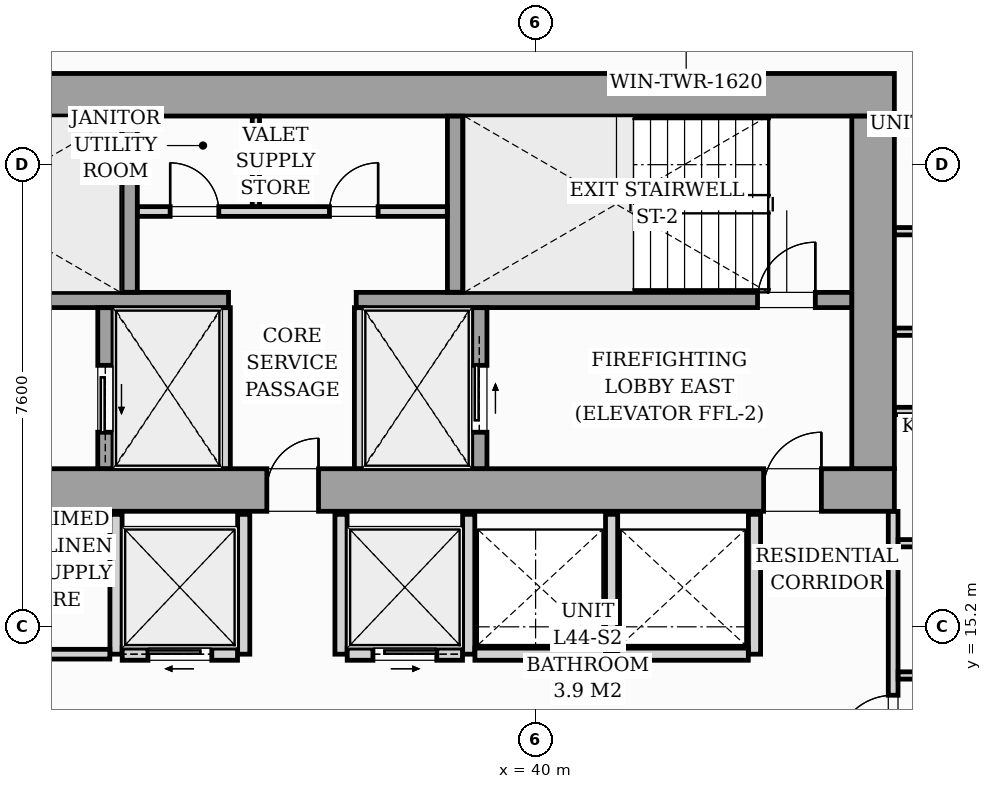
"""IFC4 building model, lengths in metres.
Left out: names, types, materials, properties, quantities, classifications, styles, units other than length and angle.
Written with IfcOpenShell. Run it as: python <this file> out.ifc"""

import sys

from ifc_helpers import new_model, si_unit, direction, frame, frame_2d, origin, origin_2d, place, context, subcontext, project, spatial, rectangle, i_section, extrude, source, transform, mapped, element, fill, save


model = new_model("IFC4")
c1 = context("Model", 3, precision=1e-05, world=origin(), true_north=direction((0.0, 1.0)))
c2 = subcontext(c1, "Body", "Model", "MODEL_VIEW")
j1 = project(units=[si_unit("LENGTHUNIT", "METRE"), si_unit("PLANEANGLEUNIT", "RADIAN")], contexts=[c1])
p1 = place(None, origin())
s1 = spatial("IfcSite", under=j1, at=p1, CompositionType="ELEMENT")
p2 = place(p1, origin())
s2 = spatial("IfcBuilding", under=s1, at=p2, CompositionType="ELEMENT")
p3 = place(p2, frame((0.0, 0.0, 153.4)))
s3 = spatial("IfcBuildingStorey", under=s2, at=p3, CompositionType="ELEMENT", Elevation=153.4)
m1 = source(origin(), c2, "Body", "SweptSolid", [
    extrude(i_section(OverallWidth=0.421, OverallDepth=0.465, WebThickness=0.045, FlangeThickness=0.073, FilletRadius=0.018, at=origin_2d()), origin(), (0.0, 0.0, 1.0), 3.196),
])
for number, where, z_axis, x_axis in (
    (1, (33.12, 17.4, 0.002), (0.0, 0.0, 1.0), (1.0, 0.0, 0.0)),
    (2, (38.88, 17.4, 0.002), (0.0, 0.0, 1.0), (1.0, 0.0, 0.0)),
    (3, (45.6, 17.4, 0.002), (0.0, 0.0, 1.0), (1.0, 0.0, 0.0)),
    (4, (33.12, 24.0, 0.002), (0.0, 0.0, 1.0), (1.0, 0.0, 0.0)),
    (5, (38.88, 24.0, 0.002), (0.0, 0.0, 1.0), (1.0, 0.0, 0.0)),
    (6, (45.6, 24.0, 0.002), (0.0, 0.0, 1.0), (1.0, 0.0, 0.0)),
):
    element("IfcColumn", number, at=place(p3, frame(where, z_axis=z_axis, x_axis=x_axis)), inside=s3, PredefinedType="PILASTER", context=c2, shape_type="MappedRepresentation", body=[
        mapped(m1, transform((0.0, 0.0, 0.0), scale=1.0)),
    ])
p4 = place(p3, frame((40.983, 25.727, 0.0), z_axis=(0.0, 0.0, 1.0), x_axis=(0.995395844771, -0.095849424686, 0.0)))
e7 = element("IfcWall", 7, at=p4, inside=s3, PredefinedType="STANDARD", context=c2, shape_type="SweptSolid", body=[
    extrude(rectangle(XDim=17.01, YDim=0.26, at=frame_2d((8.505, 0.0))), origin(), (0.0, 0.0, 1.0), 2.94),
])
p5 = place(p4, frame((9.25, 0.0, 0.0)))
e8 = element("IfcOpeningElement", 8, at=p5, cuts=e7, PredefinedType="OPENING", context=c2, shape_type="SweptSolid", body=[
    extrude(rectangle(XDim=1.8, YDim=2.06, at=frame_2d((0.9, 1.03))), frame((0.0, 0.14, 0.0), z_axis=(0.0, -1.0, 0.0), x_axis=(1.0, 0.0, 0.0)), (0.0, 0.0, 1.0), 0.28),
])
p6 = place(p4, frame((0.7, 0.0, 0.65)))
e9 = element("IfcOpeningElement", 9, at=p6, cuts=e7, PredefinedType="OPENING", context=c2, shape_type="SweptSolid", body=[
    extrude(rectangle(XDim=1.6, YDim=1.5, at=frame_2d((0.8, 0.75))), frame((0.0, 0.14, 0.0), z_axis=(0.0, -1.0, 0.0), x_axis=(1.0, 0.0, 0.0)), (0.0, 0.0, 1.0), 0.28),
])
p7 = place(p3, frame((26.1, 17.45, 0.0), z_axis=(0.0, 0.0, 1.0), x_axis=(1.0, 0.0, 0.0)))
e10 = element("IfcWall", 10, at=p7, inside=s3, PredefinedType="SHEAR", context=c2, shape_type="SweptSolid", body=[
    extrude(rectangle(XDim=19.8, YDim=0.7, at=frame_2d((9.9, 0.0))), origin(), (0.0, 0.0, 1.0), 3.2),
])
p8 = place(p7, frame((1.05, 0.0, 0.0)))
e11 = element("IfcOpeningElement", 11, at=p8, cuts=e10, PredefinedType="OPENING", context=c2, shape_type="SweptSolid", body=[
    extrude(rectangle(XDim=0.95, YDim=2.06, at=frame_2d((0.475, 1.03))), frame((0.0, 0.36, 0.0), z_axis=(0.0, -1.0, 0.0), x_axis=(1.0, 0.0, 0.0)), (0.0, 0.0, 1.0), 0.72),
])
p9 = place(p7, frame((9.48, 0.0, 0.0)))
e12 = element("IfcOpeningElement", 12, at=p9, cuts=e10, PredefinedType="OPENING", context=c2, shape_type="SweptSolid", body=[
    extrude(rectangle(XDim=0.85, YDim=2.0, at=frame_2d((0.425, 1.0))), frame((0.0, 0.36, 0.0), z_axis=(0.0, -1.0, 0.0), x_axis=(1.0, 0.0, 0.0)), (0.0, 0.0, 1.0), 0.72),
])
p10 = place(p7, frame((17.65, 0.0, 0.0)))
e13 = element("IfcOpeningElement", 13, at=p10, cuts=e10, PredefinedType="OPENING", context=c2, shape_type="SweptSolid", body=[
    extrude(rectangle(XDim=0.95, YDim=2.06, at=frame_2d((0.475, 1.03))), frame((0.0, 0.36, 0.0), z_axis=(0.0, -1.0, 0.0), x_axis=(1.0, 0.0, 0.0)), (0.0, 0.0, 1.0), 0.72),
])
p11 = place(p3, frame((26.1, 23.95, 0.0), z_axis=(0.0, 0.0, 1.0), x_axis=(1.0, 0.0, 0.0)))
e14 = element("IfcWall", 14, at=p11, inside=s3, PredefinedType="SHEAR", context=c2, shape_type="SweptSolid", body=[
    extrude(rectangle(XDim=19.8, YDim=0.7, at=frame_2d((9.9, 0.0))), origin(), (0.0, 0.0, 1.0), 3.2),
])
p12 = place(p3, frame((45.55, 17.802, 0.0), z_axis=(0.0, 0.0, 1.0), x_axis=(0.0, 1.0, 0.0)))
e15 = element("IfcWall", 15, at=p12, inside=s3, PredefinedType="SHEAR", context=c2, shape_type="SweptSolid", body=[
    extrude(rectangle(XDim=5.796, YDim=0.7, at=frame_2d((2.898, 0.0))), origin(), (0.0, 0.0, 1.0), 3.2),
])
p13 = place(p3, frame((26.802, 20.575, 0.0), z_axis=(0.0, 0.0, 1.0), x_axis=(1.0, 0.0, 0.0)))
e16 = element("IfcWall", 16, at=p13, inside=s3, PredefinedType="SOLIDWALL", context=c2, shape_type="SweptSolid", body=[
    extrude(rectangle(XDim=8.148, YDim=0.25, at=frame_2d((4.074, 0.0))), origin(), (0.0, 0.0, 1.0), 3.2),
])
p14 = place(p13, frame((0.348, 0.0, 0.0)))
e17 = element("IfcOpeningElement", 17, at=p14, cuts=e16, PredefinedType="OPENING", context=c2, shape_type="SweptSolid", body=[
    extrude(rectangle(XDim=0.95, YDim=2.06, at=frame_2d((0.475, 1.03))), frame((0.0, 0.135, 0.0), z_axis=(0.0, -1.0, 0.0), x_axis=(1.0, 0.0, 0.0)), (0.0, 0.0, 1.0), 0.27),
])
p15 = place(p3, frame((37.05, 20.575, 0.0), z_axis=(0.0, 0.0, 1.0), x_axis=(1.0, 0.0, 0.0)))
e18 = element("IfcWall", 18, at=p15, inside=s3, PredefinedType="SOLIDWALL", context=c2, shape_type="SweptSolid", body=[
    extrude(rectangle(XDim=8.148, YDim=0.25, at=frame_2d((4.074, 0.0))), origin(), (0.0, 0.0, 1.0), 3.2),
])
p16 = place(p15, frame((6.6, 0.0, 0.0)))
e19 = element("IfcOpeningElement", 19, at=p16, cuts=e18, PredefinedType="OPENING", context=c2, shape_type="SweptSolid", body=[
    extrude(rectangle(XDim=0.95, YDim=2.06, at=frame_2d((0.475, 1.03))), frame((0.0, 0.135, 0.0), z_axis=(0.0, -1.0, 0.0), x_axis=(1.0, 0.0, 0.0)), (0.0, 0.0, 1.0), 0.27),
])
for number, where, z_axis, x_axis in (
    (20, (33.325, 20.702, 0.0), (0.0, 0.0, 1.0), (0.0, 1.0, 0.0)),
    (21, (38.675, 20.702, 0.0), (0.0, 0.0, 1.0), (0.0, 1.0, 0.0)),
):
    element("IfcWall", number, at=place(p3, frame(where, z_axis=z_axis, x_axis=x_axis)), inside=s3, PredefinedType="SOLIDWALL", context=c2, shape_type="SweptSolid", body=[
        extrude(rectangle(XDim=2.896, YDim=0.25, at=frame_2d((1.448, 0.0))), origin(), (0.0, 0.0, 1.0), 3.2),
    ])
p17 = place(p3, frame((32.925, 17.802, 0.0), z_axis=(0.0, 0.0, 1.0), x_axis=(0.0, 1.0, 0.0)))
e22 = element("IfcWall", 22, at=p17, inside=s3, PredefinedType="SOLIDWALL", context=c2, shape_type="SweptSolid", body=[
    extrude(rectangle(XDim=2.646, YDim=0.25, at=frame_2d((1.323, 0.0))), origin(), (0.0, 0.0, 1.0), 3.2),
])
p18 = place(p17, frame((0.598, 0.0, 0.0)))
e23 = element("IfcOpeningElement", 23, at=p18, cuts=e22, PredefinedType="OPENING", context=c2, shape_type="SweptSolid", body=[
    extrude(rectangle(XDim=1.1, YDim=2.08, at=frame_2d((0.55, 1.04))), frame((0.0, 0.135, 0.0), z_axis=(0.0, -1.0, 0.0), x_axis=(1.0, 0.0, 0.0)), (0.0, 0.0, 1.0), 0.27),
])
for number, where, z_axis, x_axis in (
    (24, (34.9, 17.802, 0.0), (0.0, 0.0, 1.0), (0.0, 1.0, 0.0)),
    (25, (37.1, 17.802, 0.0), (0.0, 0.0, 1.0), (0.0, 1.0, 0.0)),
):
    element("IfcWall", number, at=place(p3, frame(where, z_axis=z_axis, x_axis=x_axis)), inside=s3, PredefinedType="PARTITIONING", context=c2, shape_type="SweptSolid", body=[
        extrude(rectangle(XDim=2.646, YDim=0.16, at=frame_2d((1.323, 0.0))), origin(), (0.0, 0.0, 1.0), 2.94),
    ])
p19 = place(p3, frame((39.075, 17.802, 0.0), z_axis=(0.0, 0.0, 1.0), x_axis=(0.0, 1.0, 0.0)))
e26 = element("IfcWall", 26, at=p19, inside=s3, PredefinedType="SOLIDWALL", context=c2, shape_type="SweptSolid", body=[
    extrude(rectangle(XDim=2.646, YDim=0.25, at=frame_2d((1.323, 0.0))), origin(), (0.0, 0.0, 1.0), 3.2),
])
p20 = place(p19, frame((0.598, 0.0, 0.0)))
e27 = element("IfcOpeningElement", 27, at=p20, cuts=e26, PredefinedType="OPENING", context=c2, shape_type="SweptSolid", body=[
    extrude(rectangle(XDim=1.1, YDim=2.08, at=frame_2d((0.55, 1.04))), frame((0.0, 0.135, 0.0), z_axis=(0.0, -1.0, 0.0), x_axis=(1.0, 0.0, 0.0)), (0.0, 0.0, 1.0), 0.27),
])
p21 = place(p3, frame((33.452, 22.03, 0.0), z_axis=(0.0, 0.0, 1.0), x_axis=(1.0, 0.0, 0.0)))
e28 = element("IfcWall", 28, at=p21, inside=s3, PredefinedType="PARTITIONING", context=c2, shape_type="SweptSolid", body=[
    extrude(rectangle(XDim=5.096, YDim=0.16, at=frame_2d((2.548, 0.0))), origin(), (0.0, 0.0, 1.0), 2.94),
])
p22 = place(p21, frame((0.538, 0.0, 0.0)))
e29 = element("IfcOpeningElement", 29, at=p22, cuts=e28, PredefinedType="OPENING", context=c2, shape_type="SweptSolid", body=[
    extrude(rectangle(XDim=0.8, YDim=2.05, at=frame_2d((0.4, 1.025))), frame((0.0, 0.09, 0.0), z_axis=(0.0, -1.0, 0.0), x_axis=(1.0, 0.0, 0.0)), (0.0, 0.0, 1.0), 0.18),
])
p23 = place(p21, frame((3.158, 0.0, 0.0)))
e30 = element("IfcOpeningElement", 30, at=p23, cuts=e28, PredefinedType="OPENING", context=c2, shape_type="SweptSolid", body=[
    extrude(rectangle(XDim=0.8, YDim=2.05, at=frame_2d((0.4, 1.025))), frame((0.0, 0.09, 0.0), z_axis=(0.0, -1.0, 0.0), x_axis=(1.0, 0.0, 0.0)), (0.0, 0.0, 1.0), 0.18),
])
p24 = place(p3, frame((35.4, 22.112, 0.0), z_axis=(0.0, 0.0, 1.0), x_axis=(0.0, 1.0, 0.0)))
e31 = element("IfcWall", 31, at=p24, inside=s3, PredefinedType="PARTITIONING", context=c2, shape_type="SweptSolid", body=[
    extrude(rectangle(XDim=1.486, YDim=0.12, at=frame_2d((0.743, 0.0))), origin(), (0.0, 0.0, 1.0), 2.94),
])
p25 = place(p3, frame((33.1, 14.75, 0.0), z_axis=(0.0, 0.0, 1.0), x_axis=(0.0, 1.0, 0.0)))
e32 = element("IfcWall", 32, at=p25, inside=s3, PredefinedType="PARTITIONING", context=c2, shape_type="SweptSolid", body=[
    extrude(rectangle(XDim=2.3, YDim=0.2, at=frame_2d((1.15, 0.0))), origin(), (0.0, 0.0, 1.0), 2.94),
])
p26 = place(p3, frame((28.482, 14.75, 0.0), z_axis=(0.0, 0.0, 1.0), x_axis=(1.0, 0.0, 0.0)))
e33 = element("IfcWall", 33, at=p26, inside=s3, PredefinedType="PARTITIONING", context=c2, shape_type="SweptSolid", body=[
    extrude(rectangle(XDim=4.516, YDim=0.16, at=frame_2d((2.258, 0.0))), origin(), (0.0, 0.0, 1.0), 2.94),
])
p27 = place(p26, frame((1.868, 0.0, 0.0)))
e34 = element("IfcOpeningElement", 34, at=p27, cuts=e33, PredefinedType="OPENING", context=c2, shape_type="SweptSolid", body=[
    extrude(rectangle(XDim=0.8, YDim=2.05, at=frame_2d((0.4, 1.025))), frame((0.0, 0.09, 0.0), z_axis=(0.0, -1.0, 0.0), x_axis=(1.0, 0.0, 0.0)), (0.0, 0.0, 1.0), 0.18),
])
p28 = place(p3, frame((35.2, 14.75, 0.0), z_axis=(0.0, 0.0, 1.0), x_axis=(0.0, 1.0, 0.0)))
e35 = element("IfcWall", 35, at=p28, inside=s3, PredefinedType="PARTITIONING", context=c2, shape_type="SweptSolid", body=[
    extrude(rectangle(XDim=2.3, YDim=0.2, at=frame_2d((1.15, 0.0))), origin(), (0.0, 0.0, 1.0), 2.94),
])
p29 = place(p3, frame((33.202, 14.75, 0.0), z_axis=(0.0, 0.0, 1.0), x_axis=(1.0, 0.0, 0.0)))
e36 = element("IfcWall", 36, at=p29, inside=s3, PredefinedType="PARTITIONING", context=c2, shape_type="SweptSolid", body=[
    extrude(rectangle(XDim=1.896, YDim=0.2, at=frame_2d((0.948, 0.0))), origin(), (0.0, 0.0, 1.0), 2.94),
])
p30 = place(p29, frame((0.423, 0.0, 0.0)))
e37 = element("IfcOpeningElement", 37, at=p30, cuts=e36, PredefinedType="OPENING", context=c2, shape_type="SweptSolid", body=[
    extrude(rectangle(XDim=1.05, YDim=2.08, at=frame_2d((0.525, 1.04))), frame((0.0, 0.11, 0.0), z_axis=(0.0, -1.0, 0.0), x_axis=(1.0, 0.0, 0.0)), (0.0, 0.0, 1.0), 0.22),
])
for number, where, z_axis, x_axis in (
    (38, (36.8, 14.75, 0.0), (0.0, 0.0, 1.0), (0.0, 1.0, 0.0)),
    (39, (38.9, 14.75, 0.0), (0.0, 0.0, 1.0), (0.0, 1.0, 0.0)),
):
    element("IfcWall", number, at=place(p3, frame(where, z_axis=z_axis, x_axis=x_axis)), inside=s3, PredefinedType="PARTITIONING", context=c2, shape_type="SweptSolid", body=[
        extrude(rectangle(XDim=2.3, YDim=0.2, at=frame_2d((1.15, 0.0))), origin(), (0.0, 0.0, 1.0), 2.94),
    ])
p31 = place(p3, frame((36.902, 14.75, 0.0), z_axis=(0.0, 0.0, 1.0), x_axis=(1.0, 0.0, 0.0)))
e40 = element("IfcWall", 40, at=p31, inside=s3, PredefinedType="PARTITIONING", context=c2, shape_type="SweptSolid", body=[
    extrude(rectangle(XDim=1.896, YDim=0.2, at=frame_2d((0.948, 0.0))), origin(), (0.0, 0.0, 1.0), 2.94),
])
p32 = place(p31, frame((0.423, 0.0, 0.0)))
e41 = element("IfcOpeningElement", 41, at=p32, cuts=e40, PredefinedType="OPENING", context=c2, shape_type="SweptSolid", body=[
    extrude(rectangle(XDim=1.05, YDim=2.08, at=frame_2d((0.525, 1.04))), frame((0.0, 0.11, 0.0), z_axis=(0.0, -1.0, 0.0), x_axis=(1.0, 0.0, 0.0)), (0.0, 0.0, 1.0), 0.22),
])
for number, where, z_axis, x_axis in (
    (42, (41.25, 14.75, 0.0), (0.0, 0.0, 1.0), (0.0, 1.0, 0.0)),
    (43, (43.6, 14.75, 0.0), (0.0, 0.0, 1.0), (0.0, 1.0, 0.0)),
):
    element("IfcWall", number, at=place(p3, frame(where, z_axis=z_axis, x_axis=x_axis)), inside=s3, PredefinedType="PARTITIONING", context=c2, shape_type="SweptSolid", body=[
        extrude(rectangle(XDim=2.3, YDim=0.2, at=frame_2d((1.15, 0.0))), origin(), (0.0, 0.0, 1.0), 2.94),
    ])
for number, where, z_axis, x_axis in (
    (44, (39.002, 14.75, 0.0), (0.0, 0.0, 1.0), (1.0, 0.0, 0.0)),
    (45, (41.352, 14.75, 0.0), (0.0, 0.0, 1.0), (1.0, 0.0, 0.0)),
):
    element("IfcWall", number, at=place(p3, frame(where, z_axis=z_axis, x_axis=x_axis)), inside=s3, PredefinedType="PARTITIONING", context=c2, shape_type="SweptSolid", body=[
        extrude(rectangle(XDim=2.146, YDim=0.2, at=frame_2d((1.073, 0.0))), origin(), (0.0, 0.0, 1.0), 2.94),
    ])
p33 = place(p3, frame((45.88, 12.632, 0.0), z_axis=(0.0, 0.0, 1.0), x_axis=(0.0, 1.0, 0.0)))
e46 = element("IfcWall", 46, at=p33, inside=s3, PredefinedType="PARTITIONING", context=c2, shape_type="SweptSolid", body=[
    extrude(rectangle(XDim=4.466, YDim=0.16, at=frame_2d((2.233, 0.0))), origin(), (0.0, 0.0, 1.0), 2.94),
])
p34 = place(p33, frame((0.493, 0.0, 0.0)))
e47 = element("IfcOpeningElement", 47, at=p34, cuts=e46, PredefinedType="OPENING", context=c2, shape_type="SweptSolid", body=[
    extrude(rectangle(XDim=0.95, YDim=2.06, at=frame_2d((0.475, 1.03))), frame((0.0, 0.09, 0.0), z_axis=(0.0, -1.0, 0.0), x_axis=(1.0, 0.0, 0.0)), (0.0, 0.0, 1.0), 0.18),
])
for number, where, z_axis, x_axis in (
    (48, (45.962, 16.575, 0.0), (0.0, 0.0, 1.0), (1.0, 0.0, 0.0)),
    (49, (45.962, 14.4, 0.0), (0.0, 0.0, 1.0), (1.0, 0.0, 0.0)),
):
    element("IfcWall", number, at=place(p3, frame(where, z_axis=z_axis, x_axis=x_axis)), inside=s3, PredefinedType="PARTITIONING", context=c2, shape_type="SweptSolid", body=[
        extrude(rectangle(XDim=2.256, YDim=0.12, at=frame_2d((1.128, 0.0))), origin(), (0.0, 0.0, 1.0), 2.94),
    ])
p35 = place(p3, frame((45.902, 18.75, 0.0), z_axis=(0.0, 0.0, 1.0), x_axis=(1.0, 0.0, 0.0)))
e50 = element("IfcWall", 50, at=p35, inside=s3, PredefinedType="PARTITIONING", context=c2, shape_type="SweptSolid", body=[
    extrude(rectangle(XDim=2.316, YDim=0.12, at=frame_2d((1.158, 0.0))), origin(), (0.0, 0.0, 1.0), 2.94),
])
p36 = place(p3, frame((45.902, 21.706, 0.0), z_axis=(0.0, 0.0, 1.0), x_axis=(1.0, 0.0, 0.0)))
e51 = element("IfcWall", 51, at=p36, inside=s3, PredefinedType="PARTITIONING", context=c2, shape_type="SweptSolid", body=[
    extrude(rectangle(XDim=12.775, YDim=0.12, at=frame_2d((6.388, 0.0))), origin(), (0.0, 0.0, 1.0), 2.94),
])
p37 = place(p36, frame((4.501, 0.0, 0.0)))
e52 = element("IfcOpeningElement", 52, at=p37, cuts=e51, PredefinedType="OPENING", context=c2, shape_type="SweptSolid", body=[
    extrude(rectangle(XDim=0.85, YDim=2.05, at=frame_2d((0.425, 1.025))), frame((0.0, 0.07, 0.0), z_axis=(0.0, -1.0, 0.0), x_axis=(1.0, 0.0, 0.0)), (0.0, 0.0, 1.0), 0.14),
])
p38 = place(p3, frame((45.902, 20.053, 0.0), z_axis=(0.0, 0.0, 1.0), x_axis=(1.0, 0.0, 0.0)))
e53 = element("IfcWall", 53, at=p38, inside=s3, PredefinedType="PARTITIONING", context=c2, shape_type="SweptSolid", body=[
    extrude(rectangle(XDim=14.055, YDim=0.12, at=frame_2d((7.027, 0.0))), origin(), (0.0, 0.0, 1.0), 2.94),
])
p39 = place(p38, frame((4.501, 0.0, 0.0)))
e54 = element("IfcOpeningElement", 54, at=p39, cuts=e53, PredefinedType="OPENING", context=c2, shape_type="SweptSolid", body=[
    extrude(rectangle(XDim=0.85, YDim=2.05, at=frame_2d((0.425, 1.025))), frame((0.0, 0.07, 0.0), z_axis=(0.0, -1.0, 0.0), x_axis=(1.0, 0.0, 0.0)), (0.0, 0.0, 1.0), 0.14),
])
m2 = source(origin(), c2, "Body", "SweptSolid", [
    extrude(rectangle(XDim=0.85, YDim=2.0, at=frame_2d((0.425, 1.0))), frame((0.0, 0.025, 0.0), z_axis=(0.0, -1.0, 0.0), x_axis=(1.0, 0.0, 0.0)), (0.0, 0.0, 1.0), 0.05),
])
p40 = place(p9, origin())
e55 = element("IfcDoor", 55, at=p40, inside=s3, OperationType="SINGLE_SWING_RIGHT", PredefinedType="DOOR", context=c2, shape_type="MappedRepresentation", body=[
    mapped(m2, transform((0.0, 0.0, 0.0), scale=1.0)),
])
fill(e12, e55)
m3 = source(origin(), c2, "Body", "SweptSolid", [
    extrude(rectangle(XDim=0.95, YDim=2.06, at=frame_2d((0.475, 1.03))), frame((0.0, 0.025, 0.0), z_axis=(0.0, -1.0, 0.0), x_axis=(1.0, 0.0, 0.0)), (0.0, 0.0, 1.0), 0.05),
])
p41 = place(p10, origin())
e56 = element("IfcDoor", 56, at=p41, inside=s3, OperationType="SINGLE_SWING_RIGHT", PredefinedType="DOOR", context=c2, shape_type="MappedRepresentation", body=[
    mapped(m3, transform((0.0, 0.0, 0.0), scale=1.0)),
])
fill(e13, e56)
p42 = place(p16, origin())
e57 = element("IfcDoor", 57, at=p42, inside=s3, OperationType="SINGLE_SWING_RIGHT", PredefinedType="DOOR", context=c2, shape_type="MappedRepresentation", body=[
    mapped(m3, transform((0.0, 0.0, 0.0), scale=1.0)),
])
fill(e19, e57)
m4 = source(origin(), c2, "Body", "SweptSolid", [
    extrude(rectangle(XDim=1.1, YDim=2.08, at=frame_2d((0.55, 1.04))), frame((0.0, 0.025, 0.0), z_axis=(0.0, -1.0, 0.0), x_axis=(1.0, 0.0, 0.0)), (0.0, 0.0, 1.0), 0.05),
])
p43 = place(p18, origin())
e58 = element("IfcDoor", 58, at=p43, inside=s3, OperationType="SLIDING_TO_LEFT", PredefinedType="DOOR", context=c2, shape_type="MappedRepresentation", body=[
    mapped(m4, transform((0.0, 0.0, 0.0), scale=1.0)),
])
fill(e23, e58)
p44 = place(p20, origin())
e59 = element("IfcDoor", 59, at=p44, inside=s3, OperationType="SLIDING_TO_RIGHT", PredefinedType="DOOR", context=c2, shape_type="MappedRepresentation", body=[
    mapped(m4, transform((0.0, 0.0, 0.0), scale=1.0)),
])
fill(e27, e59)
m5 = source(origin(), c2, "Body", "SweptSolid", [
    extrude(rectangle(XDim=0.8, YDim=2.05, at=frame_2d((0.4, 1.025))), frame((0.0, 0.025, 0.0), z_axis=(0.0, -1.0, 0.0), x_axis=(1.0, 0.0, 0.0)), (0.0, 0.0, 1.0), 0.05),
])
p45 = place(p22, origin())
e60 = element("IfcDoor", 60, at=p45, inside=s3, OperationType="SINGLE_SWING_LEFT", PredefinedType="DOOR", context=c2, shape_type="MappedRepresentation", body=[
    mapped(m5, transform((0.0, 0.0, 0.0), scale=1.0)),
])
fill(e29, e60)
p46 = place(p23, origin())
e61 = element("IfcDoor", 61, at=p46, inside=s3, OperationType="SINGLE_SWING_RIGHT", PredefinedType="DOOR", context=c2, shape_type="MappedRepresentation", body=[
    mapped(m5, transform((0.0, 0.0, 0.0), scale=1.0)),
])
fill(e30, e61)
m6 = source(origin(), c2, "Body", "SweptSolid", [
    extrude(rectangle(XDim=1.05, YDim=2.08, at=frame_2d((0.525, 1.04))), frame((0.0, 0.025, 0.0), z_axis=(0.0, -1.0, 0.0), x_axis=(1.0, 0.0, 0.0)), (0.0, 0.0, 1.0), 0.05),
])
p47 = place(p30, origin())
e62 = element("IfcDoor", 62, at=p47, inside=s3, OperationType="SLIDING_TO_LEFT", PredefinedType="DOOR", context=c2, shape_type="MappedRepresentation", body=[
    mapped(m6, transform((0.0, 0.0, 0.0), scale=1.0)),
])
fill(e37, e62)
p48 = place(p32, origin())
e63 = element("IfcDoor", 63, at=p48, inside=s3, OperationType="SLIDING_TO_RIGHT", PredefinedType="DOOR", context=c2, shape_type="MappedRepresentation", body=[
    mapped(m6, transform((0.0, 0.0, 0.0), scale=1.0)),
])
fill(e41, e63)
m7 = source(origin(), c2, "Body", "SweptSolid", [
    extrude(rectangle(XDim=0.95, YDim=2.06, at=frame_2d((0.475, 1.03))), frame((0.0, 0.025, 0.0), z_axis=(0.0, -1.0, 0.0), x_axis=(1.0, 0.0, 0.0)), (0.0, 0.0, 1.0), 0.05),
])
p49 = place(p34, origin())
e64 = element("IfcDoor", 64, at=p49, inside=s3, OperationType="SINGLE_SWING_LEFT", PredefinedType="DOOR", context=c2, shape_type="MappedRepresentation", body=[
    mapped(m7, transform((0.0, 0.0, 0.0), scale=1.0)),
])
fill(e47, e64)
save(model, sys.argv[1])
